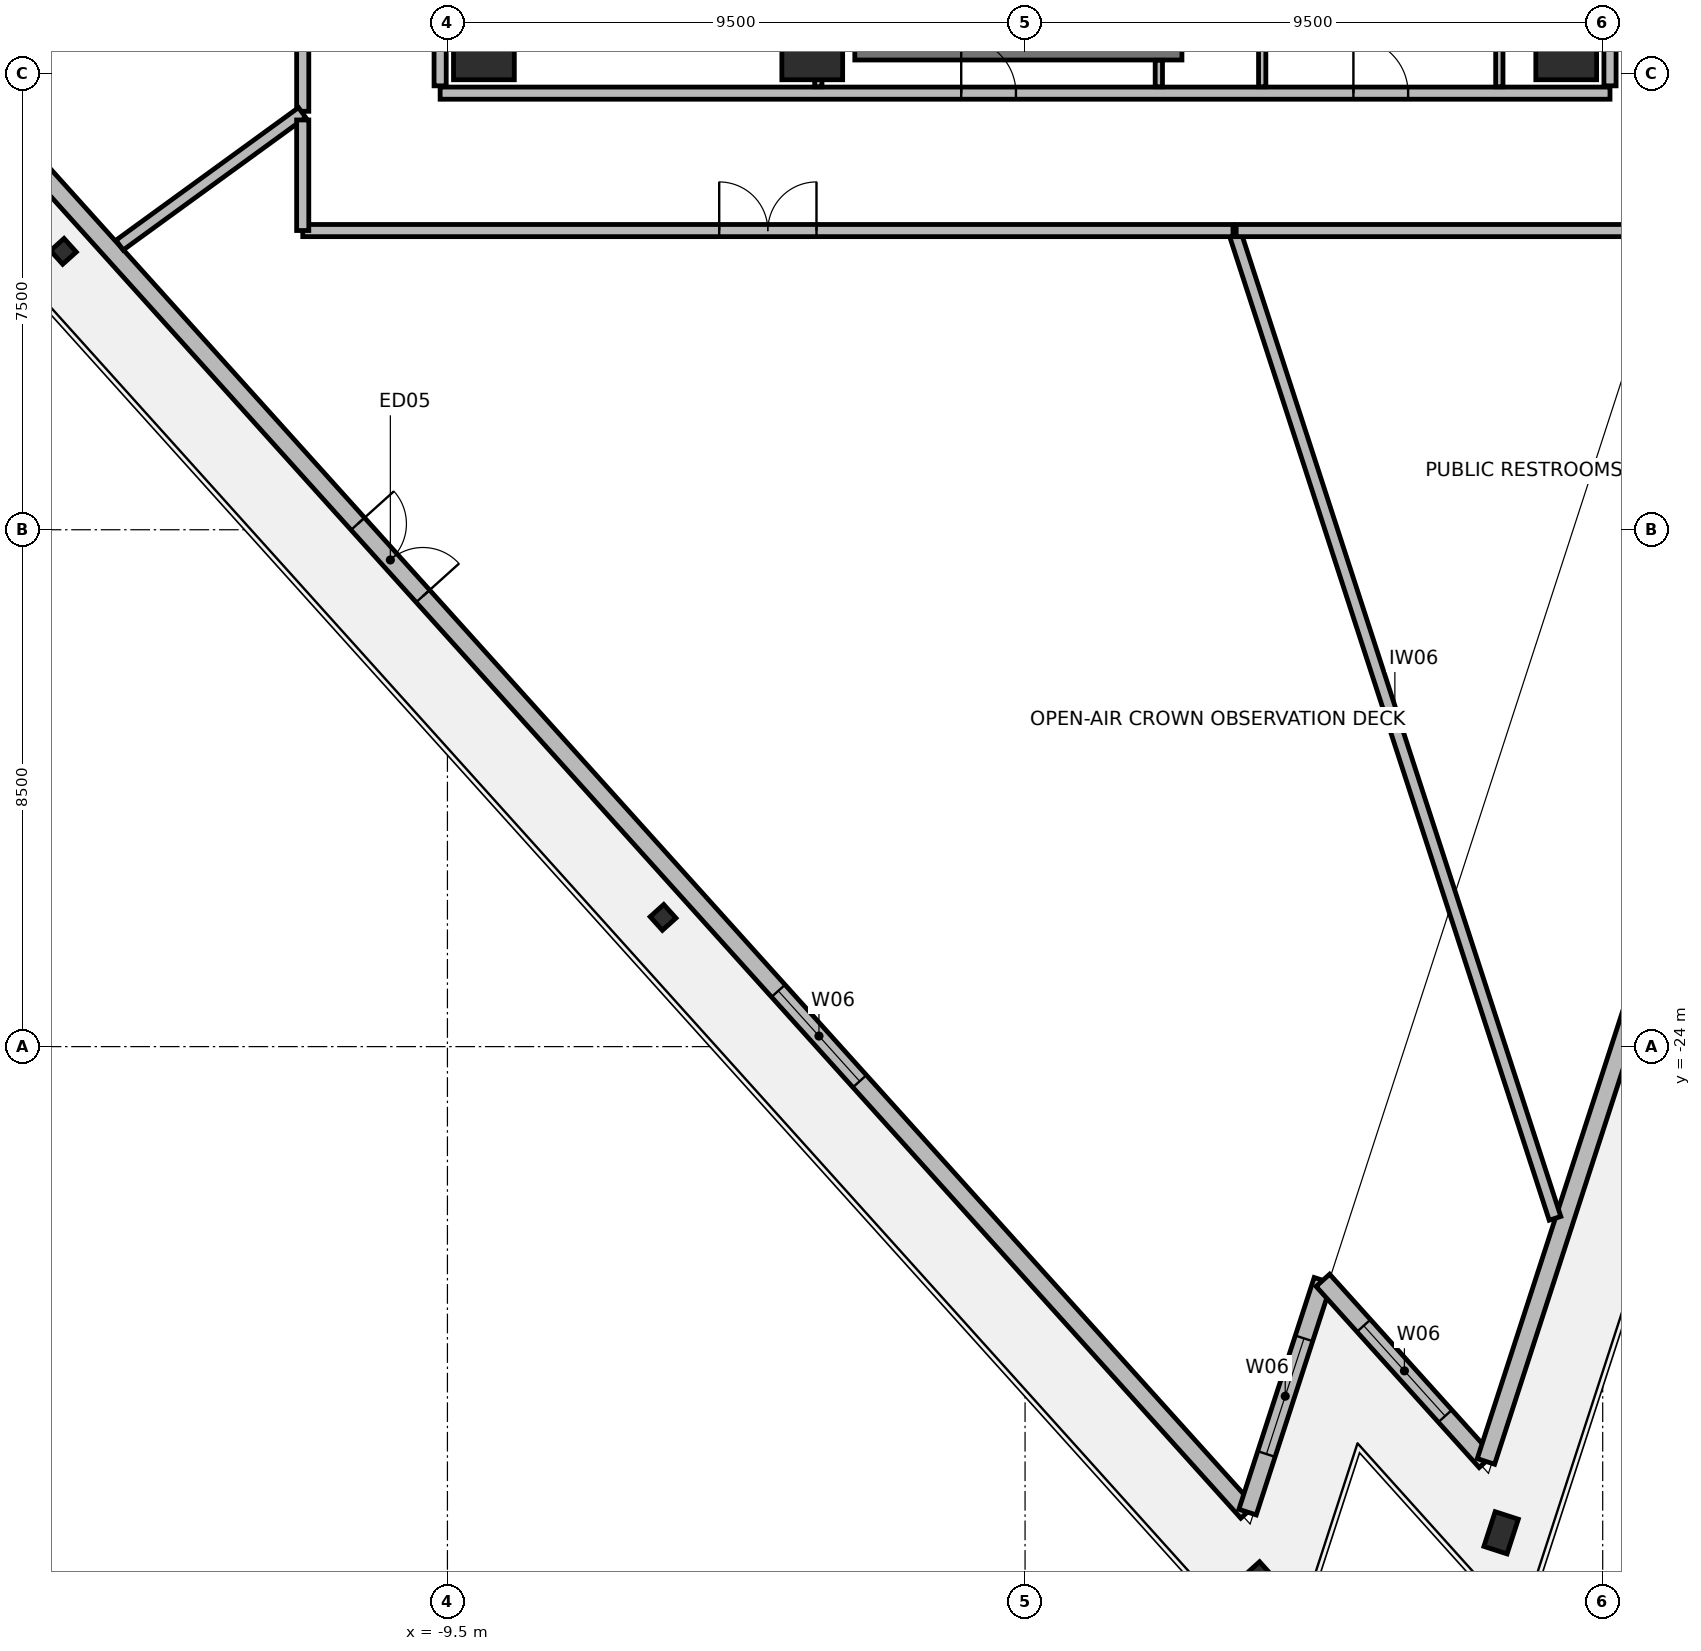
"""IFC4 building model, lengths in metres.
Left out: names, types, materials, properties, quantities, classifications, styles, units other than length and angle.
Written with IfcOpenShell. Run it as: python <this file> out.ifc"""

import sys

from ifc_helpers import new_model, si_unit, direction, frame, frame_2d, origin, origin_2d, place, context, subcontext, project, spatial, rectangle, hollow_rectangle, extrude, element, fill, save


model = new_model("IFC4")
c1 = context("Model", 3, precision=1e-05, world=origin(), true_north=direction((0.0, 1.0)))
c2 = subcontext(c1, "Body", "Model", "MODEL_VIEW")
j1 = project(units=[si_unit("LENGTHUNIT", "METRE"), si_unit("PLANEANGLEUNIT", "RADIAN")], contexts=[c1])
p1 = place(None, origin())
s1 = spatial("IfcSite", under=j1, at=p1, CompositionType="ELEMENT")
p2 = place(p1, origin())
s2 = spatial("IfcBuilding", under=s1, at=p2, CompositionType="ELEMENT")
p3 = place(p2, frame((0.0, 0.0, 306.3)))
s3 = spatial("IfcBuildingStorey", under=s2, at=p3, CompositionType="ELEMENT", Elevation=306.3)
for number, where, z_axis, x_axis in (
    (1, (-8.9, -7.6, 0.0), (0.0, 0.0, 1.0), (1.0, 0.0, 0.0)),
    (2, (-3.5, -7.6, 0.0), (0.0, 0.0, 1.0), (1.0, 0.0, 0.0)),
    (3, (8.9, -7.6, 0.0), (0.0, 0.0, 1.0), (1.0, 0.0, 0.0)),
):
    element("IfcColumn", number, at=place(p3, frame(where, z_axis=z_axis, x_axis=x_axis)), inside=s3, PredefinedType="COLUMN", context=c2, shape_type="SweptSolid", body=[
        extrude(rectangle(XDim=1.0, YDim=1.0, at=origin_2d()), origin(), (0.0, 0.0, 1.0), 4.55),
    ])
for number, where, z_axis, x_axis in (
    (4, (-15.816, -10.922, 0.0), (0.0, 0.0, 1.0), (-0.669, 0.743, 0.0)),
    (5, (-5.954, -21.875, 0.0), (0.0, 0.0, 1.0), (-0.669, 0.743, 0.0)),
):
    element("IfcColumn", number, at=place(p3, frame(where, z_axis=z_axis, x_axis=x_axis)), inside=s3, PredefinedType="COLUMN", context=c2, shape_type="SweptSolid", body=[
        extrude(hollow_rectangle(XDim=0.3, YDim=0.3, WallThickness=0.02, at=origin_2d()), origin(), (0.0, 0.0, 1.0), 4.55),
    ])
for number, where, z_axis, x_axis in (
    (6, (3.909, -32.829, 0.0), (0.0, 0.0, 1.0), (-0.669, 0.743, 0.0)),
    (7, (7.829, -31.996, 0.0), (0.0, 0.0, 1.0), (0.309, 0.951, 0.0)),
):
    element("IfcColumn", number, at=place(p3, frame(where, z_axis=z_axis, x_axis=x_axis)), inside=s3, PredefinedType="COLUMN", context=c2, shape_type="SweptSolid", body=[
        extrude(hollow_rectangle(XDim=0.4, YDim=0.6, WallThickness=0.03, at=origin_2d()), origin(), (0.0, 0.0, 1.0), 4.55),
    ])
p4 = place(p3, frame((-24.537, -0.339, 0.0), z_axis=(0.0, 0.0, 1.0), x_axis=(0.669127961041, -0.743147207324, 0.0)))
e8 = element("IfcWall", 8, at=p4, inside=s3, PredefinedType="STANDARD", context=c2, shape_type="SweptSolid", body=[
    extrude(rectangle(XDim=42.14, YDim=0.3, at=frame_2d((21.07, 0.0))), origin(), (0.0, 0.0, 1.0), 3.805),
])
p5 = place(p4, frame((20.27, 0.0, 0.0)))
e9 = element("IfcOpeningElement", 9, at=p5, cuts=e8, PredefinedType="OPENING", context=c2, shape_type="SweptSolid", body=[
    extrude(rectangle(XDim=1.6, YDim=2.3, at=frame_2d((0.8, 1.15))), frame((0.0, 0.16, 0.0), z_axis=(0.0, -1.0, 0.0), x_axis=(1.0, 0.0, 0.0)), (0.0, 0.0, 1.0), 0.32),
])
p6 = place(p4, frame((9.535, 0.0, 0.85)))
e10 = element("IfcOpeningElement", 10, at=p6, cuts=e8, PredefinedType="OPENING", context=c2, shape_type="SweptSolid", body=[
    extrude(rectangle(XDim=2.0, YDim=2.4, at=frame_2d((1.0, 1.2))), frame((0.0, 0.16, 0.0), z_axis=(0.0, -1.0, 0.0), x_axis=(1.0, 0.0, 0.0)), (0.0, 0.0, 1.0), 0.32),
])
p7 = place(p4, frame((30.605, 0.0, 0.85)))
e11 = element("IfcOpeningElement", 11, at=p7, cuts=e8, PredefinedType="OPENING", context=c2, shape_type="SweptSolid", body=[
    extrude(rectangle(XDim=2.0, YDim=2.4, at=frame_2d((1.0, 1.2))), frame((0.0, 0.16, 0.0), z_axis=(0.0, -1.0, 0.0), x_axis=(1.0, 0.0, 0.0)), (0.0, 0.0, 1.0), 0.32),
])
p8 = place(p3, frame((3.659, -31.655, 0.0), z_axis=(0.0, 0.0, 1.0), x_axis=(0.309018580232, 0.951056001018, 0.0)))
e12 = element("IfcWall", 12, at=p8, inside=s3, PredefinedType="STANDARD", context=c2, shape_type="SweptSolid", body=[
    extrude(rectangle(XDim=4.008, YDim=0.3, at=frame_2d((2.004, 0.0))), origin(), (0.0, 0.0, 1.0), 3.805),
])
p9 = place(p8, frame((1.004, 0.0, 0.85)))
e13 = element("IfcOpeningElement", 13, at=p9, cuts=e12, PredefinedType="OPENING", context=c2, shape_type="SweptSolid", body=[
    extrude(rectangle(XDim=2.0, YDim=2.4, at=frame_2d((1.0, 1.2))), frame((0.0, 0.16, 0.0), z_axis=(0.0, -1.0, 0.0), x_axis=(1.0, 0.0, 0.0)), (0.0, 0.0, 1.0), 0.32),
])
p10 = place(p3, frame((4.898, -27.843, 0.0), z_axis=(0.0, 0.0, 1.0), x_axis=(0.669132983361, -0.743142685208, 0.0)))
e14 = element("IfcWall", 14, at=p10, inside=s3, PredefinedType="STANDARD", context=c2, shape_type="SweptSolid", body=[
    extrude(rectangle(XDim=4.008, YDim=0.3, at=frame_2d((2.004, 0.0))), origin(), (0.0, 0.0, 1.0), 3.805),
])
p11 = place(p10, frame((1.004, 0.0, 0.85)))
e15 = element("IfcOpeningElement", 15, at=p11, cuts=e14, PredefinedType="OPENING", context=c2, shape_type="SweptSolid", body=[
    extrude(rectangle(XDim=2.0, YDim=2.4, at=frame_2d((1.0, 1.2))), frame((0.0, 0.16, 0.0), z_axis=(0.0, -1.0, 0.0), x_axis=(1.0, 0.0, 0.0)), (0.0, 0.0, 1.0), 0.32),
])
p12 = place(p3, frame((7.58, -30.822, 0.0), z_axis=(0.0, 0.0, 1.0), x_axis=(0.309018932156, 0.95105588667, 0.0)))
e16 = element("IfcWall", 16, at=p12, inside=s3, PredefinedType="STANDARD", context=c2, shape_type="SweptSolid", body=[
    extrude(rectangle(XDim=44.812, YDim=0.3, at=frame_2d((22.406, 0.0))), origin(), (0.0, 0.0, 1.0), 3.805),
])
p13 = place(p12, frame((21.606, 0.0, 0.0)))
e17 = element("IfcOpeningElement", 17, at=p13, cuts=e16, PredefinedType="OPENING", context=c2, shape_type="SweptSolid", body=[
    extrude(rectangle(XDim=1.6, YDim=2.3, at=frame_2d((0.8, 1.15))), frame((0.0, 0.16, 0.0), z_axis=(0.0, -1.0, 0.0), x_axis=(1.0, 0.0, 0.0)), (0.0, 0.0, 1.0), 0.32),
])
p14 = place(p12, frame((10.203, 0.0, 0.85)))
e18 = element("IfcOpeningElement", 18, at=p14, cuts=e16, PredefinedType="OPENING", context=c2, shape_type="SweptSolid", body=[
    extrude(rectangle(XDim=2.0, YDim=2.4, at=frame_2d((1.0, 1.2))), frame((0.0, 0.16, 0.0), z_axis=(0.0, -1.0, 0.0), x_axis=(1.0, 0.0, 0.0)), (0.0, 0.0, 1.0), 0.32),
])
p15 = place(p12, frame((32.609, 0.0, 0.85)))
e19 = element("IfcOpeningElement", 19, at=p15, cuts=e16, PredefinedType="OPENING", context=c2, shape_type="SweptSolid", body=[
    extrude(rectangle(XDim=2.0, YDim=2.4, at=frame_2d((1.0, 1.2))), frame((0.0, 0.16, 0.0), z_axis=(0.0, -1.0, 0.0), x_axis=(1.0, 0.0, 0.0)), (0.0, 0.0, 1.0), 0.32),
])
p16 = place(p3, frame((-2.8, -7.6, 0.0), z_axis=(0.0, 0.0, 1.0), x_axis=(1.0, 0.0, 0.0)))
e20 = element("IfcWall", 20, at=p16, inside=s3, PredefinedType="SHEAR", context=c2, shape_type="SweptSolid", body=[
    extrude(rectangle(XDim=5.38, YDim=0.35, at=frame_2d((2.69, 0.0))), origin(), (0.0, 0.0, 1.0), 4.31),
])
p17 = place(p3, frame((-9.62, -8.32, 0.0), z_axis=(0.0, 0.0, 1.0), x_axis=(1.0, 0.0, 0.0)))
e21 = element("IfcWall", 21, at=p17, inside=s3, PredefinedType="PARTITIONING", context=c2, shape_type="SweptSolid", body=[
    extrude(rectangle(XDim=19.24, YDim=0.2, at=frame_2d((9.62, 0.0))), origin(), (0.0, 0.0, 1.0), 3.805),
])
p18 = place(p17, frame((8.57, 0.0, 0.0)))
e22 = element("IfcOpeningElement", 22, at=p18, cuts=e21, PredefinedType="OPENING", context=c2, shape_type="SweptSolid", body=[
    extrude(rectangle(XDim=0.9, YDim=2.1, at=frame_2d((0.45, 1.05))), frame((0.0, 0.11, 0.0), z_axis=(0.0, -1.0, 0.0), x_axis=(1.0, 0.0, 0.0)), (0.0, 0.0, 1.0), 0.22),
])
p19 = place(p17, frame((15.02, 0.0, 0.0)))
e23 = element("IfcOpeningElement", 23, at=p19, cuts=e21, PredefinedType="OPENING", context=c2, shape_type="SweptSolid", body=[
    extrude(rectangle(XDim=0.9, YDim=2.1, at=frame_2d((0.45, 1.05))), frame((0.0, 0.11, 0.0), z_axis=(0.0, -1.0, 0.0), x_axis=(1.0, 0.0, 0.0)), (0.0, 0.0, 1.0), 0.22),
])
p20 = place(p3, frame((-9.62, 8.2, 0.0), z_axis=(0.0, 0.0, 1.0), x_axis=(0.0, -1.0, 0.0)))
e24 = element("IfcWall", 24, at=p20, inside=s3, PredefinedType="PARTITIONING", context=c2, shape_type="SweptSolid", body=[
    extrude(rectangle(XDim=16.4, YDim=0.2, at=frame_2d((8.2, 0.0))), origin(), (0.0, 0.0, 1.0), 3.805),
])
p21 = place(p20, frame((12.65, 0.0, 0.0)))
e25 = element("IfcOpeningElement", 25, at=p21, cuts=e24, PredefinedType="OPENING", context=c2, shape_type="SweptSolid", body=[
    extrude(rectangle(XDim=1.1, YDim=2.15, at=frame_2d((0.55, 1.075))), frame((0.0, 0.11, 0.0), z_axis=(0.0, -1.0, 0.0), x_axis=(1.0, 0.0, 0.0)), (0.0, 0.0, 1.0), 0.22),
])
p22 = place(p3, frame((9.62, -8.2, 0.0), z_axis=(0.0, 0.0, 1.0), x_axis=(0.0, 1.0, 0.0)))
e26 = element("IfcWall", 26, at=p22, inside=s3, PredefinedType="PARTITIONING", context=c2, shape_type="SweptSolid", body=[
    extrude(rectangle(XDim=16.4, YDim=0.2, at=frame_2d((8.2, 0.0))), origin(), (0.0, 0.0, 1.0), 3.805),
])
p23 = place(p22, frame((12.65, 0.0, 0.0)))
e27 = element("IfcOpeningElement", 27, at=p23, cuts=e26, PredefinedType="OPENING", context=c2, shape_type="SweptSolid", body=[
    extrude(rectangle(XDim=1.1, YDim=2.15, at=frame_2d((0.55, 1.075))), frame((0.0, 0.11, 0.0), z_axis=(0.0, -1.0, 0.0), x_axis=(1.0, 0.0, 0.0)), (0.0, 0.0, 1.0), 0.22),
])
p24 = place(p3, frame((2.2, -8.215, 0.0), z_axis=(0.0, 0.0, 1.0), x_axis=(0.0, 1.0, 0.0)))
e28 = element("IfcWall", 28, at=p24, inside=s3, PredefinedType="PARTITIONING", context=c2, shape_type="SweptSolid", body=[
    extrude(rectangle(XDim=0.435, YDim=0.12, at=frame_2d((0.218, 0.0))), origin(), (0.0, 0.0, 1.0), 3.605),
])
p25 = place(p3, frame((-3.4, -5.415, 0.0), z_axis=(0.0, 0.0, 1.0), x_axis=(0.0, -1.0, 0.0)))
e29 = element("IfcWall", 29, at=p25, inside=s3, PredefinedType="PARTITIONING", context=c2, shape_type="SweptSolid", body=[
    extrude(rectangle(XDim=2.8, YDim=0.12, at=frame_2d((1.4, 0.0))), origin(), (0.0, 0.0, 1.0), 3.605),
])
p26 = place(p3, frame((7.8, -8.215, 0.0), z_axis=(0.0, 0.0, 1.0), x_axis=(0.0, 1.0, 0.0)))
e30 = element("IfcWall", 30, at=p26, inside=s3, PredefinedType="PARTITIONING", context=c2, shape_type="SweptSolid", body=[
    extrude(rectangle(XDim=4.015, YDim=0.12, at=frame_2d((2.008, 0.0))), origin(), (0.0, 0.0, 1.0), 3.605),
])
p27 = place(p3, frame((3.9, -4.265, 0.0), z_axis=(0.0, 0.0, 1.0), x_axis=(0.0, -1.0, 0.0)))
e31 = element("IfcWall", 31, at=p27, inside=s3, PredefinedType="PARTITIONING", context=c2, shape_type="SweptSolid", body=[
    extrude(rectangle(XDim=3.95, YDim=0.12, at=frame_2d((1.975, 0.0))), origin(), (0.0, 0.0, 1.0), 3.605),
])
p28 = place(p3, frame((8.716, -26.824, 0.0), z_axis=(0.0, 0.0, 1.0), x_axis=(-0.309025833938, 0.951053644102, 0.0)))
e32 = element("IfcWall", 32, at=p28, inside=s3, PredefinedType="PARTITIONING", context=c2, shape_type="SweptSolid", body=[
    extrude(rectangle(XDim=17.046, YDim=0.2, at=frame_2d((8.523, 0.0))), origin(), (0.0, 0.0, 1.0), 3.805),
])
p29 = place(p3, frame((3.472, -10.58, 0.0), z_axis=(0.0, 0.0, 1.0), x_axis=(1.0, 0.0, 0.0)))
e33 = element("IfcWall", 33, at=p29, inside=s3, PredefinedType="PARTITIONING", context=c2, shape_type="SweptSolid", body=[
    extrude(rectangle(XDim=8.407, YDim=0.2, at=frame_2d((4.204, 0.0))), origin(), (0.0, 0.0, 1.0), 3.805),
])
p30 = place(p3, frame((-11.88, 8.266, 0.0), z_axis=(0.0, 0.0, 1.0), x_axis=(0.0, -1.0, 0.0)))
e34 = element("IfcWall", 34, at=p30, inside=s3, PredefinedType="PARTITIONING", context=c2, shape_type="SweptSolid", body=[
    extrude(rectangle(XDim=16.884, YDim=0.2, at=frame_2d((8.442, 0.0))), origin(), (0.0, 0.0, 1.0), 3.805),
])
p31 = place(p30, frame((7.942, 0.0, 0.0)))
e35 = element("IfcOpeningElement", 35, at=p31, cuts=e34, PredefinedType="OPENING", context=c2, shape_type="SweptSolid", body=[
    extrude(rectangle(XDim=1.0, YDim=2.15, at=frame_2d((0.5, 1.075))), frame((0.0, 0.11, 0.0), z_axis=(0.0, -1.0, 0.0), x_axis=(1.0, 0.0, 0.0)), (0.0, 0.0, 1.0), 0.22),
])
p32 = place(p3, frame((-11.89, -8.639, 0.0), z_axis=(0.0, 0.0, 1.0), x_axis=(-0.80904328996, -0.587749057822, 0.0)))
e36 = element("IfcWall", 36, at=p32, inside=s3, PredefinedType="PARTITIONING", context=c2, shape_type="SweptSolid", body=[
    extrude(rectangle(XDim=3.71, YDim=0.2, at=frame_2d((1.855, 0.0))), origin(), (0.0, 0.0, 1.0), 3.805),
])
p33 = place(p3, frame((-11.879, -10.58, 0.0), z_axis=(0.0, 0.0, 1.0), x_axis=(1.0, 0.0, 0.0)))
e37 = element("IfcWall", 37, at=p33, inside=s3, PredefinedType="PARTITIONING", context=c2, shape_type="SweptSolid", body=[
    extrude(rectangle(XDim=15.299, YDim=0.2, at=frame_2d((7.649, 0.0))), origin(), (0.0, 0.0, 1.0), 3.805),
])
p34 = place(p33, frame((6.849, 0.0, 0.0)))
e38 = element("IfcOpeningElement", 38, at=p34, cuts=e37, PredefinedType="OPENING", context=c2, shape_type="SweptSolid", body=[
    extrude(rectangle(XDim=1.6, YDim=2.2, at=frame_2d((0.8, 1.1))), frame((0.0, 0.11, 0.0), z_axis=(0.0, -1.0, 0.0), x_axis=(1.0, 0.0, 0.0)), (0.0, 0.0, 1.0), 0.22),
])
p35 = place(p3, frame((-11.88, -8.761, 0.0), z_axis=(0.0, 0.0, 1.0), x_axis=(0.0, -1.0, 0.0)))
e39 = element("IfcWall", 39, at=p35, inside=s3, PredefinedType="PARTITIONING", context=c2, shape_type="SweptSolid", body=[
    extrude(rectangle(XDim=1.818, YDim=0.2, at=frame_2d((0.909, 0.0))), origin(), (0.0, 0.0, 1.0), 3.805),
])
p36 = place(p5, frame((1.6, 0.0, 0.0), z_axis=(0.0, 0.0, 1.0), x_axis=(-1.0, 0.0, 0.0)))
e40 = element("IfcDoor", 40, at=p36, inside=s3, OperationType="DOUBLE_DOOR_SINGLE_SWING", PredefinedType="DOOR", context=c2, shape_type="SweptSolid", body=[
    extrude(rectangle(XDim=1.6, YDim=2.3, at=frame_2d((0.8, 1.15))), frame((0.0, 0.025, 0.0), z_axis=(0.0, -1.0, 0.0), x_axis=(1.0, 0.0, 0.0)), (0.0, 0.0, 1.0), 0.05),
])
fill(e9, e40)
p37 = place(p7, origin())
e41 = element("IfcWindow", 41, at=p37, inside=s3, PartitioningType="SINGLE_PANEL", PredefinedType="WINDOW", context=c2, shape_type="SweptSolid", body=[
    extrude(rectangle(XDim=2.0, YDim=2.4, at=frame_2d((1.0, 1.2))), frame((0.0, 0.03, 0.0), z_axis=(0.0, -1.0, 0.0), x_axis=(1.0, 0.0, 0.0)), (0.0, 0.0, 1.0), 0.06),
])
fill(e11, e41)
p38 = place(p9, origin())
e42 = element("IfcWindow", 42, at=p38, inside=s3, PartitioningType="SINGLE_PANEL", PredefinedType="WINDOW", context=c2, shape_type="SweptSolid", body=[
    extrude(rectangle(XDim=2.0, YDim=2.4, at=frame_2d((1.0, 1.2))), frame((0.0, 0.03, 0.0), z_axis=(0.0, -1.0, 0.0), x_axis=(1.0, 0.0, 0.0)), (0.0, 0.0, 1.0), 0.06),
])
fill(e13, e42)
p39 = place(p11, origin())
e43 = element("IfcWindow", 43, at=p39, inside=s3, PartitioningType="SINGLE_PANEL", PredefinedType="WINDOW", context=c2, shape_type="SweptSolid", body=[
    extrude(rectangle(XDim=2.0, YDim=2.4, at=frame_2d((1.0, 1.2))), frame((0.0, 0.03, 0.0), z_axis=(0.0, -1.0, 0.0), x_axis=(1.0, 0.0, 0.0)), (0.0, 0.0, 1.0), 0.06),
])
fill(e15, e43)
p40 = place(p18, origin())
e44 = element("IfcDoor", 44, at=p40, inside=s3, OperationType="SINGLE_SWING_LEFT", PredefinedType="DOOR", context=c2, shape_type="SweptSolid", body=[
    extrude(rectangle(XDim=0.9, YDim=2.1, at=frame_2d((0.45, 1.05))), frame((0.0, 0.025, 0.0), z_axis=(0.0, -1.0, 0.0), x_axis=(1.0, 0.0, 0.0)), (0.0, 0.0, 1.0), 0.05),
])
fill(e22, e44)
p41 = place(p19, origin())
e45 = element("IfcDoor", 45, at=p41, inside=s3, OperationType="SINGLE_SWING_LEFT", PredefinedType="DOOR", context=c2, shape_type="SweptSolid", body=[
    extrude(rectangle(XDim=0.9, YDim=2.1, at=frame_2d((0.45, 1.05))), frame((0.0, 0.025, 0.0), z_axis=(0.0, -1.0, 0.0), x_axis=(1.0, 0.0, 0.0)), (0.0, 0.0, 1.0), 0.05),
])
fill(e23, e45)
p42 = place(p34, origin())
e46 = element("IfcDoor", 46, at=p42, inside=s3, OperationType="DOUBLE_DOOR_SINGLE_SWING", PredefinedType="DOOR", context=c2, shape_type="SweptSolid", body=[
    extrude(rectangle(XDim=1.6, YDim=2.2, at=frame_2d((0.8, 1.1))), frame((0.0, 0.025, 0.0), z_axis=(0.0, -1.0, 0.0), x_axis=(1.0, 0.0, 0.0)), (0.0, 0.0, 1.0), 0.05),
])
fill(e38, e46)
save(model, sys.argv[1])
